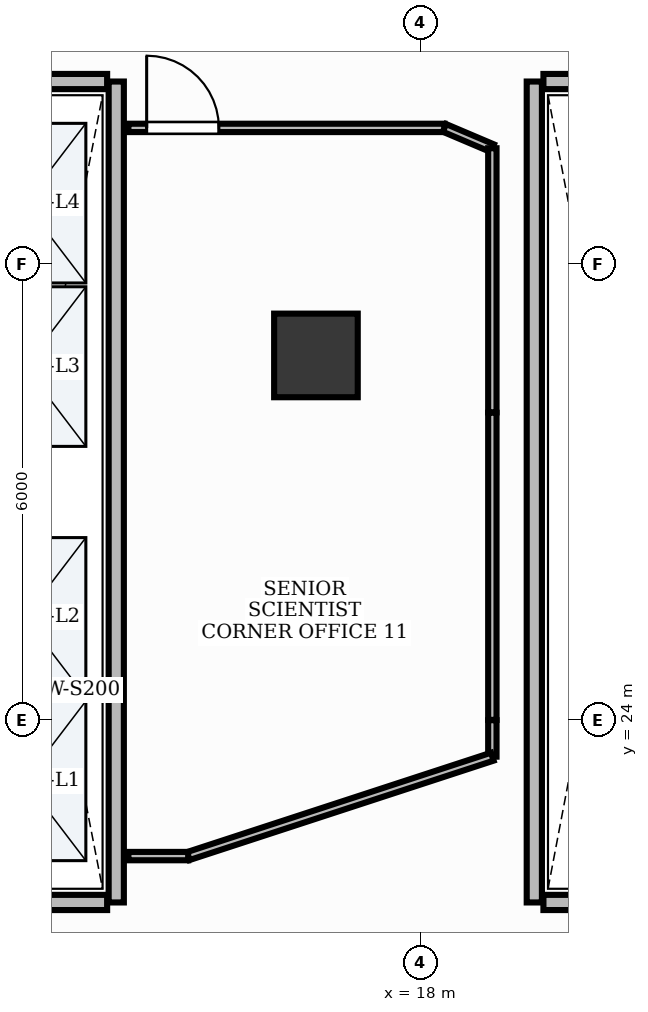
"""IFC4 building model, lengths in metres.
Left out: names, types, materials, properties, quantities, classifications, styles, units other than length and angle.
Written with IfcOpenShell. Run it as: python <this file> out.ifc"""

import sys

from ifc_helpers import new_model, si_unit, direction, frame, frame_2d, origin, origin_2d, place, context, subcontext, project, spatial, rectangle, extrude, element, fill, save


model = new_model("IFC4")
c1 = context("Model", 3, precision=1e-05, world=origin(), true_north=direction((0.0, 1.0)))
c2 = subcontext(c1, "Body", "Model", "MODEL_VIEW")
j1 = project(units=[si_unit("LENGTHUNIT", "METRE"), si_unit("PLANEANGLEUNIT", "RADIAN")], contexts=[c1])
p1 = place(None, origin())
s1 = spatial("IfcSite", under=j1, at=p1, CompositionType="ELEMENT")
p2 = place(p1, origin())
s2 = spatial("IfcBuilding", under=s1, at=p2, CompositionType="ELEMENT")
p3 = place(p2, frame((0.0, 0.0, 90.0)))
s3 = spatial("IfcBuildingStorey", under=s2, at=p3, CompositionType="ELEMENT", Elevation=90.0)
p4 = place(p3, frame((16.627, 28.797, -0.0), z_axis=(0.0, 0.0, 1.0), x_axis=(1.0, 0.0, 0.0)))
e1 = element("IfcColumn", 1, at=p4, inside=s3, PredefinedType="COLUMN", context=c2, shape_type="SweptSolid", body=[
    extrude(rectangle(XDim=1.1, YDim=1.1, at=origin_2d()), origin(), (0.0, 0.0, 1.0), 3.901),
])
p5 = place(p3, frame((14.0, 21.6, 0.0), z_axis=(0.0, 0.0, 1.0), x_axis=(0.0, 1.0, 0.0)))
e2 = element("IfcWall", 2, at=p5, inside=s3, PredefinedType="PARTITIONING", context=c2, shape_type="SweptSolid", body=[
    extrude(rectangle(XDim=10.8, YDim=0.2, at=frame_2d((5.4, 0.0))), origin(), (0.0, 0.0, 1.0), 2.91),
])
for number, where, z_axis, x_axis in (
    (3, (11.72, 21.6, 0.0), (0.0, 0.0, 1.0), (1.0, 0.0, 0.0)),
    (4, (11.72, 32.4, 0.0), (0.0, 0.0, 1.0), (1.0, 0.0, 0.0)),
):
    element("IfcWall", number, at=place(p3, frame(where, z_axis=z_axis, x_axis=x_axis)), inside=s3, PredefinedType="PARTITIONING", context=c2, shape_type="SweptSolid", body=[
        extrude(rectangle(XDim=2.16, YDim=0.2, at=frame_2d((1.08, 0.0))), origin(), (0.0, 0.0, 1.0), 2.91),
    ])
p6 = place(p3, frame((19.5, 21.6, 0.0), z_axis=(0.0, 0.0, 1.0), x_axis=(0.0, 1.0, 0.0)))
e5 = element("IfcWall", 5, at=p6, inside=s3, PredefinedType="PARTITIONING", context=c2, shape_type="SweptSolid", body=[
    extrude(rectangle(XDim=10.8, YDim=0.2, at=frame_2d((5.4, 0.0))), origin(), (0.0, 0.0, 1.0), 2.91),
])
for number, where, z_axis, x_axis in (
    (6, (19.62, 21.6, 0.0), (0.0, 0.0, 1.0), (1.0, 0.0, 0.0)),
    (7, (19.62, 32.4, 0.0), (0.0, 0.0, 1.0), (1.0, 0.0, 0.0)),
):
    element("IfcWall", number, at=place(p3, frame(where, z_axis=z_axis, x_axis=x_axis)), inside=s3, PredefinedType="PARTITIONING", context=c2, shape_type="SweptSolid", body=[
        extrude(rectangle(XDim=2.11, YDim=0.2, at=frame_2d((1.055, 0.0))), origin(), (0.0, 0.0, 1.0), 2.91),
    ])
p7 = place(p3, frame((14.16, 31.79, 0.0), z_axis=(0.0, 0.0, 1.0), x_axis=(1.0, 0.0, 0.0)))
e8 = element("IfcWall", 8, at=p7, inside=s3, PredefinedType="MOVABLE", context=c2, shape_type="SweptSolid", body=[
    extrude(rectangle(XDim=4.158, YDim=0.11, at=frame_2d((2.079, 0.0))), origin(), (0.0, 0.0, 1.0), 2.91),
])
p8 = place(p7, frame((0.24, 0.0, 0.0)))
e9 = element("IfcOpeningElement", 9, at=p8, cuts=e8, PredefinedType="OPENING", context=c2, shape_type="SweptSolid", body=[
    extrude(rectangle(XDim=0.95, YDim=2.15, at=frame_2d((0.475, 1.075))), frame((0.0, 0.07, 0.0), z_axis=(0.0, -1.0, 0.0), x_axis=(1.0, 0.0, 0.0)), (0.0, 0.0, 1.0), 0.14),
])
p9 = place(p3, frame((18.318, 31.79, 0.0), z_axis=(0.0, 0.0, 1.0), x_axis=(0.920523463189, -0.390687283795, 0.0)))
e10 = element("IfcWall", 10, at=p9, inside=s3, PredefinedType="MOVABLE", context=c2, shape_type="SweptSolid", body=[
    extrude(rectangle(XDim=0.684, YDim=0.11, at=frame_2d((0.342, 0.0))), origin(), (0.0, 0.0, 1.0), 2.91),
])
p10 = place(p3, frame((18.948, 31.522, 0.0), z_axis=(0.0, 0.0, 1.0), x_axis=(0.0, -1.0, 0.0)))
e11 = element("IfcWall", 11, at=p10, inside=s3, PredefinedType="MOVABLE", context=c2, shape_type="SweptSolid", body=[
    extrude(rectangle(XDim=3.475, YDim=0.11, at=frame_2d((1.738, 0.0))), origin(), (0.0, 0.0, 1.0), 2.91),
])
p11 = place(p3, frame((18.948, 28.043, 0.0), z_axis=(0.0, 0.0, 1.0), x_axis=(0.0, -1.0, 0.0)))
e12 = element("IfcWall", 12, at=p11, inside=s3, PredefinedType="MOVABLE", context=c2, shape_type="SweptSolid", body=[
    extrude(rectangle(XDim=4.041, YDim=0.11, at=frame_2d((2.021, 0.0))), origin(), (0.0, 0.0, 1.0), 2.91),
])
p12 = place(p3, frame((18.948, 23.998, 0.0), z_axis=(0.0, 0.0, 1.0), x_axis=(0.0, -1.0, 0.0)))
e13 = element("IfcWall", 13, at=p12, inside=s3, PredefinedType="MOVABLE", context=c2, shape_type="SweptSolid", body=[
    extrude(rectangle(XDim=0.48, YDim=0.11, at=frame_2d((0.24, 0.0))), origin(), (0.0, 0.0, 1.0), 2.91),
])
p13 = place(p3, frame((18.948, 23.518, 0.0), z_axis=(0.0, 0.0, 1.0), x_axis=(-0.950522660163, -0.31065523095, 0.0)))
e14 = element("IfcWall", 14, at=p13, inside=s3, PredefinedType="MOVABLE", context=c2, shape_type="SweptSolid", body=[
    extrude(rectangle(XDim=4.21, YDim=0.11, at=frame_2d((2.105, 0.0))), origin(), (0.0, 0.0, 1.0), 2.91),
])
p14 = place(p3, frame((14.946, 22.21, 0.0), z_axis=(0.0, 0.0, 1.0), x_axis=(-1.0, 0.0, 0.0)))
e15 = element("IfcWall", 15, at=p14, inside=s3, PredefinedType="MOVABLE", context=c2, shape_type="SweptSolid", body=[
    extrude(rectangle(XDim=0.786, YDim=0.11, at=frame_2d((0.393, 0.0))), origin(), (0.0, 0.0, 1.0), 2.91),
])
p15 = place(p8, origin())
e16 = element("IfcDoor", 16, at=p15, inside=s3, OperationType="SINGLE_SWING_LEFT", PredefinedType="DOOR", context=c2, shape_type="SweptSolid", body=[
    extrude(rectangle(XDim=0.95, YDim=2.15, at=frame_2d((0.475, 1.075))), frame((0.0, 0.025, 0.0), z_axis=(0.0, -1.0, 0.0), x_axis=(1.0, 0.0, 0.0)), (0.0, 0.0, 1.0), 0.05),
])
fill(e9, e16)
save(model, sys.argv[1])
